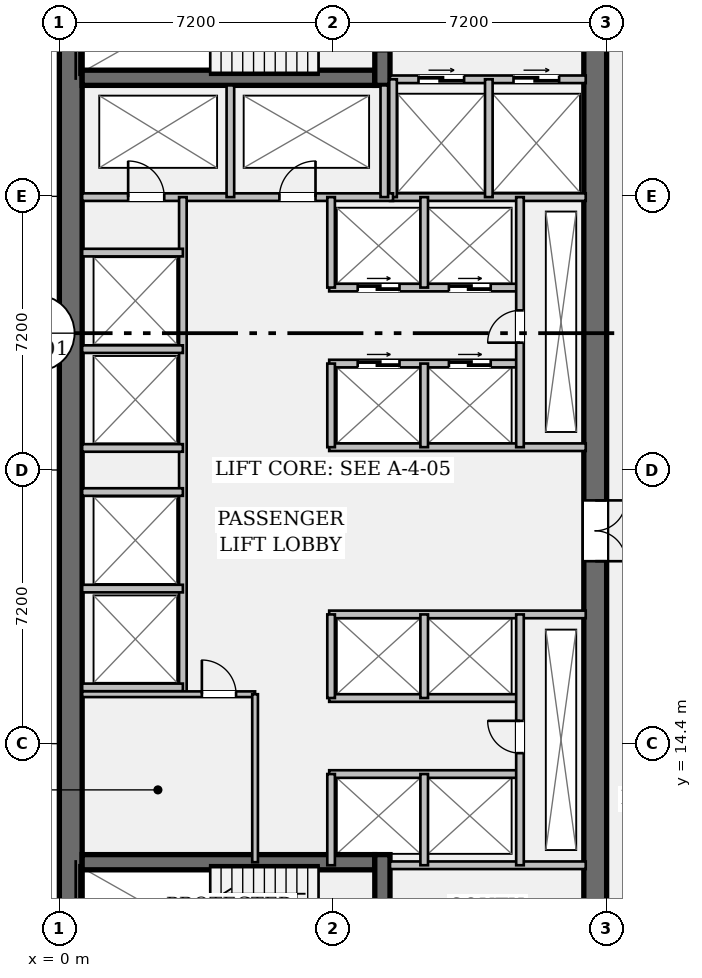
"""IFC4 building model, lengths in metres.
Left out: names, types, materials, properties, quantities, classifications, styles, units other than length and angle.
Written with IfcOpenShell. Run it as: python <this file> out.ifc"""

import sys

from ifc_helpers import new_model, si_unit, direction, frame, frame_2d, origin, place, context, subcontext, project, spatial, rectangle, extrude, element, fill, save


model = new_model("IFC4")
c1 = context("Model", 3, precision=1e-05, world=origin(), true_north=direction((0.0, 1.0)))
c2 = subcontext(c1, "Body", "Model", "MODEL_VIEW")
j1 = project(units=[si_unit("LENGTHUNIT", "METRE"), si_unit("PLANEANGLEUNIT", "RADIAN")], contexts=[c1])
p1 = place(None, origin())
s1 = spatial("IfcSite", under=j1, at=p1, CompositionType="ELEMENT")
p2 = place(p1, origin())
s2 = spatial("IfcBuilding", under=s1, at=p2, CompositionType="ELEMENT")
p3 = place(p2, frame((0.0, 0.0, 88.9)))
s3 = spatial("IfcBuildingStorey", under=s2, at=p3, CompositionType="ELEMENT", Elevation=88.9)
p4 = place(p3, frame((0.3, 7.2, 0.0), z_axis=(0.0, 0.0, 1.0), x_axis=(0.0, 1.0, 0.0)))
e1 = element("IfcWall", 1, at=p4, inside=s3, PredefinedType="SHEAR", context=c2, shape_type="SweptSolid", body=[
    extrude(rectangle(XDim=28.8, YDim=0.6, at=frame_2d((14.4, 0.0))), origin(), (0.0, 0.0, 1.0), 3.57),
])
p5 = place(p3, frame((14.1, 35.4, 0.0), z_axis=(0.0, 0.0, 1.0), x_axis=(0.0, -1.0, 0.0)))
e2 = element("IfcWall", 2, at=p5, inside=s3, PredefinedType="SHEAR", context=c2, shape_type="SweptSolid", body=[
    extrude(rectangle(XDim=27.6, YDim=0.6, at=frame_2d((13.8, 0.0))), origin(), (0.0, 0.0, 1.0), 3.57),
])
p6 = place(p5, frame((1.3, 0.0, 0.0)))
e3 = element("IfcOpeningElement", 3, at=p6, cuts=e2, PredefinedType="OPENING", context=c2, shape_type="SweptSolid", body=[
    extrude(rectangle(XDim=1.2, YDim=2.15, at=frame_2d((0.6, 1.075))), frame((0.0, 0.312, 0.0), z_axis=(0.0, -1.0, 0.0), x_axis=(1.0, 0.0, 0.0)), (0.0, 0.0, 1.0), 0.624),
])
p7 = place(p5, frame((25.25, 0.0, 0.0)))
e4 = element("IfcOpeningElement", 4, at=p7, cuts=e2, PredefinedType="OPENING", context=c2, shape_type="SweptSolid", body=[
    extrude(rectangle(XDim=1.2, YDim=2.15, at=frame_2d((0.6, 1.075))), frame((0.0, 0.312, 0.0), z_axis=(0.0, -1.0, 0.0), x_axis=(1.0, 0.0, 0.0)), (0.0, 0.0, 1.0), 0.624),
])
p8 = place(p5, frame((14.6, 0.0, 0.0)))
e5 = element("IfcOpeningElement", 5, at=p8, cuts=e2, PredefinedType="OPENING", context=c2, shape_type="SweptSolid", body=[
    extrude(rectangle(XDim=1.6, YDim=2.2, at=frame_2d((0.8, 1.1))), frame((0.0, 0.312, 0.0), z_axis=(0.0, -1.0, 0.0), x_axis=(1.0, 0.0, 0.0)), (0.0, 0.0, 1.0), 0.624),
])
for number, where, z_axis, x_axis in (
    (6, (0.6, 31.92, 0.0), (0.0, 0.0, 1.0), (1.0, 0.0, 0.0)),
    (7, (0.6, 11.28, 0.0), (0.0, 0.0, 1.0), (1.0, 0.0, 0.0)),
):
    element("IfcWall", number, at=place(p3, frame(where, z_axis=z_axis, x_axis=x_axis)), inside=s3, PredefinedType="SHEAR", context=c2, shape_type="SweptSolid", body=[
        extrude(rectangle(XDim=7.7, YDim=0.4, at=frame_2d((3.85, 0.0))), origin(), (0.0, 0.0, 1.0), 3.57),
    ])
p9 = place(p3, frame((8.5, 31.72, 0.0), z_axis=(0.0, 0.0, 1.0), x_axis=(0.0, 1.0, 0.0)))
e8 = element("IfcWall", 8, at=p9, inside=s3, PredefinedType="SHEAR", context=c2, shape_type="SweptSolid", body=[
    extrude(rectangle(XDim=3.68, YDim=0.4, at=frame_2d((1.84, 0.0))), origin(), (0.0, 0.0, 1.0), 3.57),
])
p10 = place(p9, frame((0.9, 0.0, 0.0)))
e9 = element("IfcOpeningElement", 9, at=p10, cuts=e8, PredefinedType="OPENING", context=c2, shape_type="SweptSolid", body=[
    extrude(rectangle(XDim=1.1, YDim=2.15, at=frame_2d((0.55, 1.075))), frame((0.0, 0.212, 0.0), z_axis=(0.0, -1.0, 0.0), x_axis=(1.0, 0.0, 0.0)), (0.0, 0.0, 1.0), 0.424),
])
p11 = place(p3, frame((8.5, 7.8, 0.0), z_axis=(0.0, 0.0, 1.0), x_axis=(0.0, 1.0, 0.0)))
e10 = element("IfcWall", 10, at=p11, inside=s3, PredefinedType="SHEAR", context=c2, shape_type="SweptSolid", body=[
    extrude(rectangle(XDim=3.68, YDim=0.4, at=frame_2d((1.84, 0.0))), origin(), (0.0, 0.0, 1.0), 3.57),
])
p12 = place(p11, frame((0.85, 0.0, 0.0)))
e11 = element("IfcOpeningElement", 11, at=p12, cuts=e10, PredefinedType="OPENING", context=c2, shape_type="SweptSolid", body=[
    extrude(rectangle(XDim=1.1, YDim=2.15, at=frame_2d((0.55, 1.075))), frame((0.0, 0.212, 0.0), z_axis=(0.0, -1.0, 0.0), x_axis=(1.0, 0.0, 0.0)), (0.0, 0.0, 1.0), 0.424),
])
p13 = place(p3, frame((8.7, 31.88, 0.0), z_axis=(0.0, 0.0, 1.0), x_axis=(1.0, 0.0, 0.0)))
e12 = element("IfcWall", 12, at=p13, inside=s3, PredefinedType="PARTITIONING", context=c2, shape_type="SweptSolid", body=[
    extrude(rectangle(XDim=5.15, YDim=0.2, at=frame_2d((2.575, 0.0))), origin(), (0.0, 0.0, 1.0), 3.57),
])
p14 = place(p13, frame((0.75, 0.0, 0.0)))
e13 = element("IfcOpeningElement", 13, at=p14, cuts=e12, PredefinedType="OPENING", context=c2, shape_type="SweptSolid", body=[
    extrude(rectangle(XDim=1.2, YDim=2.2, at=frame_2d((0.6, 1.1))), frame((0.0, 0.112, 0.0), z_axis=(0.0, -1.0, 0.0), x_axis=(1.0, 0.0, 0.0)), (0.0, 0.0, 1.0), 0.224),
])
p15 = place(p13, frame((3.25, 0.0, 0.0)))
e14 = element("IfcOpeningElement", 14, at=p15, cuts=e12, PredefinedType="OPENING", context=c2, shape_type="SweptSolid", body=[
    extrude(rectangle(XDim=1.2, YDim=2.2, at=frame_2d((0.6, 1.1))), frame((0.0, 0.112, 0.0), z_axis=(0.0, -1.0, 0.0), x_axis=(1.0, 0.0, 0.0)), (0.0, 0.0, 1.0), 0.224),
])
for number, where, z_axis, x_axis in (
    (15, (8.7, 11.2, 0.0), (0.0, 0.0, 1.0), (1.0, 0.0, 0.0)),
    (16, (8.7, 28.78, 0.0), (0.0, 0.0, 1.0), (1.0, 0.0, 0.0)),
):
    element("IfcWall", number, at=place(p3, frame(where, z_axis=z_axis, x_axis=x_axis)), inside=s3, PredefinedType="PARTITIONING", context=c2, shape_type="SweptSolid", body=[
        extrude(rectangle(XDim=5.15, YDim=0.2, at=frame_2d((2.575, 0.0))), origin(), (0.0, 0.0, 1.0), 3.57),
    ])
for number, where, z_axis, x_axis in (
    (17, (8.78, 28.78, 0.0), (0.0, 0.0, 1.0), (0.0, 1.0, 0.0)),
    (18, (11.3, 28.78, 0.0), (0.0, 0.0, 1.0), (0.0, 1.0, 0.0)),
):
    element("IfcWall", number, at=place(p3, frame(where, z_axis=z_axis, x_axis=x_axis)), inside=s3, PredefinedType="PARTITIONING", context=c2, shape_type="SweptSolid", body=[
        extrude(rectangle(XDim=3.1, YDim=0.2, at=frame_2d((1.55, 0.0))), origin(), (0.0, 0.0, 1.0), 3.57),
    ])
p16 = place(p3, frame((0.6, 28.78, 0.0), z_axis=(0.0, 0.0, 1.0), x_axis=(1.0, 0.0, 0.0)))
e19 = element("IfcWall", 19, at=p16, inside=s3, PredefinedType="PARTITIONING", context=c2, shape_type="SweptSolid", body=[
    extrude(rectangle(XDim=8.18, YDim=0.2, at=frame_2d((4.09, 0.0))), origin(), (0.0, 0.0, 1.0), 3.57),
])
p17 = place(p16, frame((1.21, 0.0, 0.0)))
e20 = element("IfcOpeningElement", 20, at=p17, cuts=e19, PredefinedType="OPENING", context=c2, shape_type="SweptSolid", body=[
    extrude(rectangle(XDim=0.95, YDim=2.15, at=frame_2d((0.475, 1.075))), frame((0.0, 0.112, 0.0), z_axis=(0.0, -1.0, 0.0), x_axis=(1.0, 0.0, 0.0)), (0.0, 0.0, 1.0), 0.224),
])
p18 = place(p16, frame((5.19, 0.0, 0.0)))
e21 = element("IfcOpeningElement", 21, at=p18, cuts=e19, PredefinedType="OPENING", context=c2, shape_type="SweptSolid", body=[
    extrude(rectangle(XDim=0.95, YDim=2.15, at=frame_2d((0.475, 1.075))), frame((0.0, 0.112, 0.0), z_axis=(0.0, -1.0, 0.0), x_axis=(1.0, 0.0, 0.0)), (0.0, 0.0, 1.0), 0.224),
])
for number, where, z_axis, x_axis in (
    (22, (4.5, 28.78, 0.0), (0.0, 0.0, 1.0), (0.0, 1.0, 0.0)),
    (23, (8.55, 28.78, 0.0), (0.0, 0.0, 1.0), (0.0, 1.0, 0.0)),
):
    element("IfcWall", number, at=place(p3, frame(where, z_axis=z_axis, x_axis=x_axis)), inside=s3, PredefinedType="PARTITIONING", context=c2, shape_type="SweptSolid", body=[
        extrude(rectangle(XDim=2.94, YDim=0.2, at=frame_2d((1.47, 0.0))), origin(), (0.0, 0.0, 1.0), 3.57),
    ])
p19 = place(p3, frame((3.25, 15.7, 0.0), z_axis=(0.0, 0.0, 1.0), x_axis=(0.0, 1.0, 0.0)))
e24 = element("IfcWall", 24, at=p19, inside=s3, PredefinedType="PARTITIONING", context=c2, shape_type="SweptSolid", body=[
    extrude(rectangle(XDim=13.08, YDim=0.2, at=frame_2d((6.54, 0.0))), origin(), (0.0, 0.0, 1.0), 3.57),
])
for number, where, z_axis, x_axis in (
    (25, (0.6, 15.88, 0.0), (0.0, 0.0, 1.0), (1.0, 0.0, 0.0)),
    (26, (0.6, 18.48, 0.0), (0.0, 0.0, 1.0), (1.0, 0.0, 0.0)),
    (27, (0.6, 22.18, 0.0), (0.0, 0.0, 1.0), (1.0, 0.0, 0.0)),
    (28, (0.6, 24.78, 0.0), (0.0, 0.0, 1.0), (1.0, 0.0, 0.0)),
    (29, (0.6, 21.02, 0.0), (0.0, 0.0, 1.0), (1.0, 0.0, 0.0)),
    (30, (0.6, 27.32, 0.0), (0.0, 0.0, 1.0), (1.0, 0.0, 0.0)),
):
    element("IfcWall", number, at=place(p3, frame(where, z_axis=z_axis, x_axis=x_axis)), inside=s3, PredefinedType="PARTITIONING", context=c2, shape_type="SweptSolid", body=[
        extrude(rectangle(XDim=2.65, YDim=0.2, at=frame_2d((1.325, 0.0))), origin(), (0.0, 0.0, 1.0), 3.57),
    ])
p20 = place(p3, frame((7.1, 22.2, 0.0), z_axis=(0.0, 0.0, 1.0), x_axis=(1.0, 0.0, 0.0)))
e31 = element("IfcWall", 31, at=p20, inside=s3, PredefinedType="PARTITIONING", context=c2, shape_type="SweptSolid", body=[
    extrude(rectangle(XDim=6.75, YDim=0.2, at=frame_2d((3.375, 0.0))), origin(), (0.0, 0.0, 1.0), 3.57),
])
p21 = place(p3, frame((7.1, 24.4, 0.0), z_axis=(0.0, 0.0, 1.0), x_axis=(1.0, 0.0, 0.0)))
e32 = element("IfcWall", 32, at=p21, inside=s3, PredefinedType="PARTITIONING", context=c2, shape_type="SweptSolid", body=[
    extrude(rectangle(XDim=5.02, YDim=0.2, at=frame_2d((2.51, 0.0))), origin(), (0.0, 0.0, 1.0), 3.57),
])
p22 = place(p21, frame((0.75, 0.0, 0.0)))
e33 = element("IfcOpeningElement", 33, at=p22, cuts=e32, PredefinedType="OPENING", context=c2, shape_type="SweptSolid", body=[
    extrude(rectangle(XDim=1.1, YDim=2.2, at=frame_2d((0.55, 1.1))), frame((0.0, 0.112, 0.0), z_axis=(0.0, -1.0, 0.0), x_axis=(1.0, 0.0, 0.0)), (0.0, 0.0, 1.0), 0.224),
])
p23 = place(p21, frame((3.15, 0.0, 0.0)))
e34 = element("IfcOpeningElement", 34, at=p23, cuts=e32, PredefinedType="OPENING", context=c2, shape_type="SweptSolid", body=[
    extrude(rectangle(XDim=1.1, YDim=2.2, at=frame_2d((0.55, 1.1))), frame((0.0, 0.112, 0.0), z_axis=(0.0, -1.0, 0.0), x_axis=(1.0, 0.0, 0.0)), (0.0, 0.0, 1.0), 0.224),
])
p24 = place(p3, frame((7.1, 26.4, 0.0), z_axis=(0.0, 0.0, 1.0), x_axis=(1.0, 0.0, 0.0)))
e35 = element("IfcWall", 35, at=p24, inside=s3, PredefinedType="PARTITIONING", context=c2, shape_type="SweptSolid", body=[
    extrude(rectangle(XDim=5.02, YDim=0.2, at=frame_2d((2.51, 0.0))), origin(), (0.0, 0.0, 1.0), 3.57),
])
p25 = place(p24, frame((0.75, 0.0, 0.0)))
e36 = element("IfcOpeningElement", 36, at=p25, cuts=e35, PredefinedType="OPENING", context=c2, shape_type="SweptSolid", body=[
    extrude(rectangle(XDim=1.1, YDim=2.2, at=frame_2d((0.55, 1.1))), frame((0.0, 0.112, 0.0), z_axis=(0.0, -1.0, 0.0), x_axis=(1.0, 0.0, 0.0)), (0.0, 0.0, 1.0), 0.224),
])
p26 = place(p24, frame((3.15, 0.0, 0.0)))
e37 = element("IfcOpeningElement", 37, at=p26, cuts=e35, PredefinedType="OPENING", context=c2, shape_type="SweptSolid", body=[
    extrude(rectangle(XDim=1.1, YDim=2.2, at=frame_2d((0.55, 1.1))), frame((0.0, 0.112, 0.0), z_axis=(0.0, -1.0, 0.0), x_axis=(1.0, 0.0, 0.0)), (0.0, 0.0, 1.0), 0.224),
])
p27 = place(p3, frame((7.15, 22.2, 0.0), z_axis=(0.0, 0.0, 1.0), x_axis=(0.0, 1.0, 0.0)))
e38 = element("IfcWall", 38, at=p27, inside=s3, PredefinedType="PARTITIONING", context=c2, shape_type="SweptSolid", body=[
    extrude(rectangle(XDim=2.2, YDim=0.2, at=frame_2d((1.1, 0.0))), origin(), (0.0, 0.0, 1.0), 3.57),
])
p28 = place(p3, frame((7.15, 26.4, 0.0), z_axis=(0.0, 0.0, 1.0), x_axis=(0.0, 1.0, 0.0)))
e39 = element("IfcWall", 39, at=p28, inside=s3, PredefinedType="PARTITIONING", context=c2, shape_type="SweptSolid", body=[
    extrude(rectangle(XDim=2.38, YDim=0.2, at=frame_2d((1.19, 0.0))), origin(), (0.0, 0.0, 1.0), 3.57),
])
p29 = place(p3, frame((9.6, 22.2, 0.0), z_axis=(0.0, 0.0, 1.0), x_axis=(0.0, 1.0, 0.0)))
e40 = element("IfcWall", 40, at=p29, inside=s3, PredefinedType="PARTITIONING", context=c2, shape_type="SweptSolid", body=[
    extrude(rectangle(XDim=2.2, YDim=0.2, at=frame_2d((1.1, 0.0))), origin(), (0.0, 0.0, 1.0), 3.57),
])
p30 = place(p3, frame((9.6, 26.4, 0.0), z_axis=(0.0, 0.0, 1.0), x_axis=(0.0, 1.0, 0.0)))
e41 = element("IfcWall", 41, at=p30, inside=s3, PredefinedType="PARTITIONING", context=c2, shape_type="SweptSolid", body=[
    extrude(rectangle(XDim=2.38, YDim=0.2, at=frame_2d((1.19, 0.0))), origin(), (0.0, 0.0, 1.0), 3.57),
])
p31 = place(p3, frame((12.12, 22.2, 0.0), z_axis=(0.0, 0.0, 1.0), x_axis=(0.0, 1.0, 0.0)))
e42 = element("IfcWall", 42, at=p31, inside=s3, PredefinedType="PARTITIONING", context=c2, shape_type="SweptSolid", body=[
    extrude(rectangle(XDim=6.58, YDim=0.2, at=frame_2d((3.29, 0.0))), origin(), (0.0, 0.0, 1.0), 3.57),
])
p32 = place(p31, frame((2.75, 0.0, 0.0)))
e43 = element("IfcOpeningElement", 43, at=p32, cuts=e42, PredefinedType="OPENING", context=c2, shape_type="SweptSolid", body=[
    extrude(rectangle(XDim=0.85, YDim=2.15, at=frame_2d((0.425, 1.075))), frame((0.0, 0.112, 0.0), z_axis=(0.0, -1.0, 0.0), x_axis=(1.0, 0.0, 0.0)), (0.0, 0.0, 1.0), 0.224),
])
p33 = place(p3, frame((7.1, 17.8, 0.0), z_axis=(0.0, 0.0, 1.0), x_axis=(1.0, 0.0, 0.0)))
e44 = element("IfcWall", 44, at=p33, inside=s3, PredefinedType="PARTITIONING", context=c2, shape_type="SweptSolid", body=[
    extrude(rectangle(XDim=6.75, YDim=0.2, at=frame_2d((3.375, 0.0))), origin(), (0.0, 0.0, 1.0), 3.57),
])
for number, where, z_axis, x_axis in (
    (45, (7.1, 15.6, 0.0), (0.0, 0.0, 1.0), (1.0, 0.0, 0.0)),
    (46, (7.1, 13.6, 0.0), (0.0, 0.0, 1.0), (1.0, 0.0, 0.0)),
):
    element("IfcWall", number, at=place(p3, frame(where, z_axis=z_axis, x_axis=x_axis)), inside=s3, PredefinedType="PARTITIONING", context=c2, shape_type="SweptSolid", body=[
        extrude(rectangle(XDim=5.02, YDim=0.2, at=frame_2d((2.51, 0.0))), origin(), (0.0, 0.0, 1.0), 3.57),
    ])
p34 = place(p3, frame((7.15, 15.6, 0.0), z_axis=(0.0, 0.0, 1.0), x_axis=(0.0, 1.0, 0.0)))
e47 = element("IfcWall", 47, at=p34, inside=s3, PredefinedType="PARTITIONING", context=c2, shape_type="SweptSolid", body=[
    extrude(rectangle(XDim=2.2, YDim=0.2, at=frame_2d((1.1, 0.0))), origin(), (0.0, 0.0, 1.0), 3.57),
])
p35 = place(p3, frame((7.15, 11.2, 0.0), z_axis=(0.0, 0.0, 1.0), x_axis=(0.0, 1.0, 0.0)))
e48 = element("IfcWall", 48, at=p35, inside=s3, PredefinedType="PARTITIONING", context=c2, shape_type="SweptSolid", body=[
    extrude(rectangle(XDim=2.4, YDim=0.2, at=frame_2d((1.2, 0.0))), origin(), (0.0, 0.0, 1.0), 3.57),
])
p36 = place(p3, frame((9.6, 15.6, 0.0), z_axis=(0.0, 0.0, 1.0), x_axis=(0.0, 1.0, 0.0)))
e49 = element("IfcWall", 49, at=p36, inside=s3, PredefinedType="PARTITIONING", context=c2, shape_type="SweptSolid", body=[
    extrude(rectangle(XDim=2.2, YDim=0.2, at=frame_2d((1.1, 0.0))), origin(), (0.0, 0.0, 1.0), 3.57),
])
p37 = place(p3, frame((9.6, 11.2, 0.0), z_axis=(0.0, 0.0, 1.0), x_axis=(0.0, 1.0, 0.0)))
e50 = element("IfcWall", 50, at=p37, inside=s3, PredefinedType="PARTITIONING", context=c2, shape_type="SweptSolid", body=[
    extrude(rectangle(XDim=2.4, YDim=0.2, at=frame_2d((1.2, 0.0))), origin(), (0.0, 0.0, 1.0), 3.57),
])
p38 = place(p3, frame((12.12, 11.2, 0.0), z_axis=(0.0, 0.0, 1.0), x_axis=(0.0, 1.0, 0.0)))
e51 = element("IfcWall", 51, at=p38, inside=s3, PredefinedType="PARTITIONING", context=c2, shape_type="SweptSolid", body=[
    extrude(rectangle(XDim=6.6, YDim=0.2, at=frame_2d((3.3, 0.0))), origin(), (0.0, 0.0, 1.0), 3.57),
])
p39 = place(p38, frame((2.95, 0.0, 0.0)))
e52 = element("IfcOpeningElement", 52, at=p39, cuts=e51, PredefinedType="OPENING", context=c2, shape_type="SweptSolid", body=[
    extrude(rectangle(XDim=0.85, YDim=2.15, at=frame_2d((0.425, 1.075))), frame((0.0, 0.112, 0.0), z_axis=(0.0, -1.0, 0.0), x_axis=(1.0, 0.0, 0.0)), (0.0, 0.0, 1.0), 0.224),
])
p40 = place(p3, frame((0.6, 15.7, 0.0), z_axis=(0.0, 0.0, 1.0), x_axis=(1.0, 0.0, 0.0)))
e53 = element("IfcWall", 53, at=p40, inside=s3, PredefinedType="PARTITIONING", context=c2, shape_type="SweptSolid", body=[
    extrude(rectangle(XDim=4.55, YDim=0.15, at=frame_2d((2.275, 0.0))), origin(), (0.0, 0.0, 1.0), 3.57),
])
p41 = place(p40, frame((3.15, 0.0, 0.0)))
e54 = element("IfcOpeningElement", 54, at=p41, cuts=e53, PredefinedType="OPENING", context=c2, shape_type="SweptSolid", body=[
    extrude(rectangle(XDim=0.9, YDim=2.15, at=frame_2d((0.45, 1.075))), frame((0.0, 0.087, 0.0), z_axis=(0.0, -1.0, 0.0), x_axis=(1.0, 0.0, 0.0)), (0.0, 0.0, 1.0), 0.174),
])
p42 = place(p3, frame((5.15, 11.28, 0.0), z_axis=(0.0, 0.0, 1.0), x_axis=(0.0, 1.0, 0.0)))
e55 = element("IfcWall", 55, at=p42, inside=s3, PredefinedType="PARTITIONING", context=c2, shape_type="SweptSolid", body=[
    extrude(rectangle(XDim=4.42, YDim=0.15, at=frame_2d((2.21, 0.0))), origin(), (0.0, 0.0, 1.0), 3.57),
])
p43 = place(p14, origin())
e56 = element("IfcDoor", 56, at=p43, inside=s3, OperationType="DOUBLE_DOOR_SLIDING", PredefinedType="DOOR", context=c2, shape_type="SweptSolid", body=[
    extrude(rectangle(XDim=1.2, YDim=2.2, at=frame_2d((0.6, 1.1))), frame((0.0, 0.025, 0.0), z_axis=(0.0, -1.0, 0.0), x_axis=(1.0, 0.0, 0.0)), (0.0, 0.0, 1.0), 0.05),
])
fill(e13, e56)
p44 = place(p15, origin())
e57 = element("IfcDoor", 57, at=p44, inside=s3, OperationType="DOUBLE_DOOR_SLIDING", PredefinedType="DOOR", context=c2, shape_type="SweptSolid", body=[
    extrude(rectangle(XDim=1.2, YDim=2.2, at=frame_2d((0.6, 1.1))), frame((0.0, 0.025, 0.0), z_axis=(0.0, -1.0, 0.0), x_axis=(1.0, 0.0, 0.0)), (0.0, 0.0, 1.0), 0.05),
])
fill(e14, e57)
p45 = place(p17, origin())
e58 = element("IfcDoor", 58, at=p45, inside=s3, OperationType="SINGLE_SWING_LEFT", PredefinedType="DOOR", context=c2, shape_type="SweptSolid", body=[
    extrude(rectangle(XDim=0.95, YDim=2.15, at=frame_2d((0.475, 1.075))), frame((0.0, 0.025, 0.0), z_axis=(0.0, -1.0, 0.0), x_axis=(1.0, 0.0, 0.0)), (0.0, 0.0, 1.0), 0.05),
])
fill(e20, e58)
p46 = place(p18, origin())
e59 = element("IfcDoor", 59, at=p46, inside=s3, OperationType="SINGLE_SWING_RIGHT", PredefinedType="DOOR", context=c2, shape_type="SweptSolid", body=[
    extrude(rectangle(XDim=0.95, YDim=2.15, at=frame_2d((0.475, 1.075))), frame((0.0, 0.025, 0.0), z_axis=(0.0, -1.0, 0.0), x_axis=(1.0, 0.0, 0.0)), (0.0, 0.0, 1.0), 0.05),
])
fill(e21, e59)
p47 = place(p8, origin())
e60 = element("IfcDoor", 60, at=p47, inside=s3, OperationType="DOUBLE_DOOR_SINGLE_SWING", PredefinedType="DOOR", context=c2, shape_type="SweptSolid", body=[
    extrude(rectangle(XDim=1.6, YDim=2.2, at=frame_2d((0.8, 1.1))), frame((0.0, 0.025, 0.0), z_axis=(0.0, -1.0, 0.0), x_axis=(1.0, 0.0, 0.0)), (0.0, 0.0, 1.0), 0.05),
])
fill(e5, e60)
p48 = place(p32, origin())
e61 = element("IfcDoor", 61, at=p48, inside=s3, OperationType="SINGLE_SWING_LEFT", PredefinedType="DOOR", context=c2, shape_type="SweptSolid", body=[
    extrude(rectangle(XDim=0.85, YDim=2.15, at=frame_2d((0.425, 1.075))), frame((0.0, 0.025, 0.0), z_axis=(0.0, -1.0, 0.0), x_axis=(1.0, 0.0, 0.0)), (0.0, 0.0, 1.0), 0.05),
])
fill(e43, e61)
p49 = place(p22, origin())
e62 = element("IfcDoor", 62, at=p49, inside=s3, OperationType="DOUBLE_DOOR_SLIDING", PredefinedType="DOOR", context=c2, shape_type="SweptSolid", body=[
    extrude(rectangle(XDim=1.1, YDim=2.2, at=frame_2d((0.55, 1.1))), frame((0.0, 0.025, 0.0), z_axis=(0.0, -1.0, 0.0), x_axis=(1.0, 0.0, 0.0)), (0.0, 0.0, 1.0), 0.05),
])
fill(e33, e62)
p50 = place(p23, origin())
e63 = element("IfcDoor", 63, at=p50, inside=s3, OperationType="DOUBLE_DOOR_SLIDING", PredefinedType="DOOR", context=c2, shape_type="SweptSolid", body=[
    extrude(rectangle(XDim=1.1, YDim=2.2, at=frame_2d((0.55, 1.1))), frame((0.0, 0.025, 0.0), z_axis=(0.0, -1.0, 0.0), x_axis=(1.0, 0.0, 0.0)), (0.0, 0.0, 1.0), 0.05),
])
fill(e34, e63)
p51 = place(p25, origin())
e64 = element("IfcDoor", 64, at=p51, inside=s3, OperationType="DOUBLE_DOOR_SLIDING", PredefinedType="DOOR", context=c2, shape_type="SweptSolid", body=[
    extrude(rectangle(XDim=1.1, YDim=2.2, at=frame_2d((0.55, 1.1))), frame((0.0, 0.025, 0.0), z_axis=(0.0, -1.0, 0.0), x_axis=(1.0, 0.0, 0.0)), (0.0, 0.0, 1.0), 0.05),
])
fill(e36, e64)
p52 = place(p26, origin())
e65 = element("IfcDoor", 65, at=p52, inside=s3, OperationType="DOUBLE_DOOR_SLIDING", PredefinedType="DOOR", context=c2, shape_type="SweptSolid", body=[
    extrude(rectangle(XDim=1.1, YDim=2.2, at=frame_2d((0.55, 1.1))), frame((0.0, 0.025, 0.0), z_axis=(0.0, -1.0, 0.0), x_axis=(1.0, 0.0, 0.0)), (0.0, 0.0, 1.0), 0.05),
])
fill(e37, e65)
p53 = place(p39, origin())
e66 = element("IfcDoor", 66, at=p53, inside=s3, OperationType="SINGLE_SWING_RIGHT", PredefinedType="DOOR", context=c2, shape_type="SweptSolid", body=[
    extrude(rectangle(XDim=0.85, YDim=2.15, at=frame_2d((0.425, 1.075))), frame((0.0, 0.025, 0.0), z_axis=(0.0, -1.0, 0.0), x_axis=(1.0, 0.0, 0.0)), (0.0, 0.0, 1.0), 0.05),
])
fill(e52, e66)
p54 = place(p41, origin())
e67 = element("IfcDoor", 67, at=p54, inside=s3, OperationType="SINGLE_SWING_LEFT", PredefinedType="DOOR", context=c2, shape_type="SweptSolid", body=[
    extrude(rectangle(XDim=0.9, YDim=2.15, at=frame_2d((0.45, 1.075))), frame((0.0, 0.025, 0.0), z_axis=(0.0, -1.0, 0.0), x_axis=(1.0, 0.0, 0.0)), (0.0, 0.0, 1.0), 0.05),
])
fill(e54, e67)
save(model, sys.argv[1])
